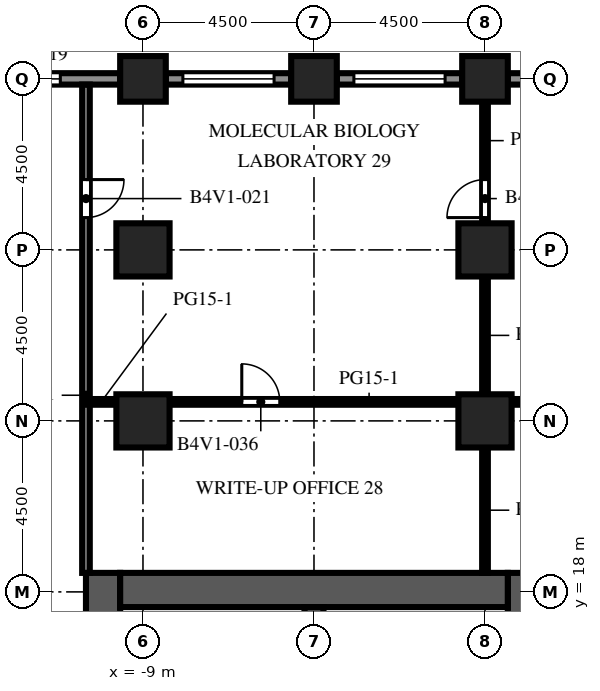
"""IFC4 building model, lengths in metres.
Left out: names, types, materials, properties, quantities, classifications, styles, units other than length and angle.
Written with IfcOpenShell. Run it as: python <this file> out.ifc"""

import sys

from ifc_helpers import new_model, si_unit, direction, frame, frame_2d, origin, origin_2d, place, context, subcontext, project, spatial, rectangle, extrude, element, fill, save


model = new_model("IFC4")
c1 = context("Model", 3, precision=1e-05, world=origin(), true_north=direction((0.0, 1.0)))
c2 = subcontext(c1, "Body", "Model", "MODEL_VIEW")
j1 = project(units=[si_unit("LENGTHUNIT", "METRE"), si_unit("PLANEANGLEUNIT", "RADIAN")], contexts=[c1])
p1 = place(None, origin())
s1 = spatial("IfcSite", under=j1, at=p1, CompositionType="ELEMENT")
p2 = place(p1, origin())
s2 = spatial("IfcBuilding", under=s1, at=p2, CompositionType="ELEMENT")
p3 = place(p2, frame((0.0, 0.0, 133.1)))
s3 = spatial("IfcBuildingStorey", under=s2, at=p3, CompositionType="ELEMENT", Elevation=133.1)
for number, where, z_axis, x_axis in (
    (1, (-9.0, 31.5, 0.0), (0.0, 0.0, 1.0), (1.0, 0.0, 0.0)),
    (2, (-4.5, 31.5, 0.0), (0.0, 0.0, 1.0), (1.0, 0.0, 0.0)),
    (3, (0.0, 31.5, 0.0), (0.0, 0.0, 1.0), (1.0, 0.0, 0.0)),
):
    element("IfcColumn", number, at=place(p3, frame(where, z_axis=z_axis, x_axis=x_axis)), inside=s3, PredefinedType="COLUMN", context=c2, shape_type="SweptSolid", body=[
        extrude(rectangle(XDim=1.2, YDim=1.2, at=origin_2d()), origin(), (0.0, 0.0, 1.0), 4.1),
    ])
for number, where, z_axis, x_axis in (
    (4, (-9.0, 22.5, 0.0), (0.0, 0.0, 1.0), (1.0, 0.0, 0.0)),
    (5, (-9.0, 27.0, 0.0), (0.0, 0.0, 1.0), (1.0, 0.0, 0.0)),
    (6, (0.0, 22.5, 0.0), (0.0, 0.0, 1.0), (1.0, 0.0, 0.0)),
    (7, (0.0, 27.0, 0.0), (0.0, 0.0, 1.0), (1.0, 0.0, 0.0)),
):
    element("IfcColumn", number, at=place(p3, frame(where, z_axis=z_axis, x_axis=x_axis)), inside=s3, PredefinedType="COLUMN", context=c2, shape_type="SweptSolid", body=[
        extrude(rectangle(XDim=1.4, YDim=1.4, at=origin_2d()), origin(), (0.0, 0.0, 1.0), 4.1),
    ])
p4 = place(p3, frame((-10.05, -9.0, 0.0), z_axis=(0.0, 0.0, 1.0), x_axis=(0.0, 1.0, 0.0)))
e8 = element("IfcWall", 8, at=p4, inside=s3, PredefinedType="SHEAR", context=c2, shape_type="SweptSolid", body=[
    extrude(rectangle(XDim=27.5, YDim=0.9, at=frame_2d((13.75, 0.0))), origin(), (0.0, 0.0, 1.0), 4.1),
])
p5 = place(p4, frame((12.55, 0.0, 0.0)))
e9 = element("IfcOpeningElement", 9, at=p5, cuts=e8, PredefinedType="OPENING", context=c2, shape_type="SweptSolid", body=[
    extrude(rectangle(XDim=2.4, YDim=2.4, at=frame_2d((1.2, 1.2))), frame((0.0, 0.46, 0.0), z_axis=(0.0, -1.0, 0.0), x_axis=(1.0, 0.0, 0.0)), (0.0, 0.0, 1.0), 0.92),
])
p6 = place(p4, frame((6.825, 0.0, 0.0)))
e10 = element("IfcOpeningElement", 10, at=p6, cuts=e8, PredefinedType="OPENING", context=c2, shape_type="SweptSolid", body=[
    extrude(rectangle(XDim=1.2, YDim=2.1, at=frame_2d((0.6, 1.05))), frame((0.0, 0.46, 0.0), z_axis=(0.0, -1.0, 0.0), x_axis=(1.0, 0.0, 0.0)), (0.0, 0.0, 1.0), 0.92),
])
p7 = place(p4, frame((19.475, 0.0, 0.0)))
e11 = element("IfcOpeningElement", 11, at=p7, cuts=e8, PredefinedType="OPENING", context=c2, shape_type="SweptSolid", body=[
    extrude(rectangle(XDim=1.2, YDim=2.1, at=frame_2d((0.6, 1.05))), frame((0.0, 0.46, 0.0), z_axis=(0.0, -1.0, 0.0), x_axis=(1.0, 0.0, 0.0)), (0.0, 0.0, 1.0), 0.92),
])
p8 = place(p3, frame((1.05, -9.0, 0.0), z_axis=(0.0, 0.0, 1.0), x_axis=(0.0, 1.0, 0.0)))
e12 = element("IfcWall", 12, at=p8, inside=s3, PredefinedType="SHEAR", context=c2, shape_type="SweptSolid", body=[
    extrude(rectangle(XDim=27.5, YDim=0.9, at=frame_2d((13.75, 0.0))), origin(), (0.0, 0.0, 1.0), 4.1),
])
p9 = place(p8, frame((12.55, 0.0, 0.0)))
e13 = element("IfcOpeningElement", 13, at=p9, cuts=e12, PredefinedType="OPENING", context=c2, shape_type="SweptSolid", body=[
    extrude(rectangle(XDim=2.4, YDim=2.4, at=frame_2d((1.2, 1.2))), frame((0.0, 0.46, 0.0), z_axis=(0.0, -1.0, 0.0), x_axis=(1.0, 0.0, 0.0)), (0.0, 0.0, 1.0), 0.92),
])
p10 = place(p8, frame((3.975, 0.0, 0.0)))
e14 = element("IfcOpeningElement", 14, at=p10, cuts=e12, PredefinedType="OPENING", context=c2, shape_type="SweptSolid", body=[
    extrude(rectangle(XDim=1.2, YDim=2.1, at=frame_2d((0.6, 1.05))), frame((0.0, 0.46, 0.0), z_axis=(0.0, -1.0, 0.0), x_axis=(1.0, 0.0, 0.0)), (0.0, 0.0, 1.0), 0.92),
])
p11 = place(p8, frame((22.325, 0.0, 0.0)))
e15 = element("IfcOpeningElement", 15, at=p11, cuts=e12, PredefinedType="OPENING", context=c2, shape_type="SweptSolid", body=[
    extrude(rectangle(XDim=1.2, YDim=2.1, at=frame_2d((0.6, 1.05))), frame((0.0, 0.46, 0.0), z_axis=(0.0, -1.0, 0.0), x_axis=(1.0, 0.0, 0.0)), (0.0, 0.0, 1.0), 0.92),
])
p12 = place(p3, frame((-9.6, 18.05, 0.0), z_axis=(0.0, 0.0, 1.0), x_axis=(1.0, 0.0, 0.0)))
e16 = element("IfcWall", 16, at=p12, inside=s3, PredefinedType="SHEAR", context=c2, shape_type="SweptSolid", body=[
    extrude(rectangle(XDim=10.2, YDim=0.9, at=frame_2d((5.1, 0.0))), origin(), (0.0, 0.0, 1.0), 4.1),
])
p13 = place(p3, frame((-4.5, 10.25, 0.0), z_axis=(0.0, 0.0, 1.0), x_axis=(0.0, 1.0, 0.0)))
e17 = element("IfcWall", 17, at=p13, inside=s3, PredefinedType="SHEAR", context=c2, shape_type="SweptSolid", body=[
    extrude(rectangle(XDim=7.35, YDim=0.5, at=frame_2d((3.675, 0.0))), origin(), (0.0, 0.0, 1.0), 4.1),
])
p14 = place(p3, frame((0.6, 31.5, 0.0), z_axis=(0.0, 0.0, 1.0), x_axis=(1.0, 0.0, 0.0)))
e18 = element("IfcWall", 18, at=p14, inside=s3, PredefinedType="SOLIDWALL", context=c2, shape_type="SweptSolid", body=[
    extrude(rectangle(XDim=3.3, YDim=0.3, at=frame_2d((1.65, 0.0))), origin(), (0.0, 0.0, 1.0), 2.75),
])
p15 = place(p14, frame((0.45, 0.0, 0.8)))
e19 = element("IfcOpeningElement", 19, at=p15, cuts=e18, PredefinedType="OPENING", context=c2, shape_type="SweptSolid", body=[
    extrude(rectangle(XDim=2.4, YDim=1.7, at=frame_2d((1.2, 0.85))), frame((0.0, 0.16, 0.0), z_axis=(0.0, -1.0, 0.0), x_axis=(1.0, 0.0, 0.0)), (0.0, 0.0, 1.0), 0.32),
])
p16 = place(p3, frame((-3.9, 31.5, 0.0), z_axis=(0.0, 0.0, 1.0), x_axis=(1.0, 0.0, 0.0)))
e20 = element("IfcWall", 20, at=p16, inside=s3, PredefinedType="SOLIDWALL", context=c2, shape_type="SweptSolid", body=[
    extrude(rectangle(XDim=3.3, YDim=0.3, at=frame_2d((1.65, 0.0))), origin(), (0.0, 0.0, 1.0), 2.75),
])
p17 = place(p16, frame((0.45, 0.0, 0.8)))
e21 = element("IfcOpeningElement", 21, at=p17, cuts=e20, PredefinedType="OPENING", context=c2, shape_type="SweptSolid", body=[
    extrude(rectangle(XDim=2.4, YDim=1.7, at=frame_2d((1.2, 0.85))), frame((0.0, 0.16, 0.0), z_axis=(0.0, -1.0, 0.0), x_axis=(1.0, 0.0, 0.0)), (0.0, 0.0, 1.0), 0.32),
])
p18 = place(p3, frame((-8.4, 31.5, 0.0), z_axis=(0.0, 0.0, 1.0), x_axis=(1.0, 0.0, 0.0)))
e22 = element("IfcWall", 22, at=p18, inside=s3, PredefinedType="SOLIDWALL", context=c2, shape_type="SweptSolid", body=[
    extrude(rectangle(XDim=3.3, YDim=0.3, at=frame_2d((1.65, 0.0))), origin(), (0.0, 0.0, 1.0), 2.75),
])
p19 = place(p18, frame((0.45, 0.0, 0.8)))
e23 = element("IfcOpeningElement", 23, at=p19, cuts=e22, PredefinedType="OPENING", context=c2, shape_type="SweptSolid", body=[
    extrude(rectangle(XDim=2.4, YDim=1.7, at=frame_2d((1.2, 0.85))), frame((0.0, 0.16, 0.0), z_axis=(0.0, -1.0, 0.0), x_axis=(1.0, 0.0, 0.0)), (0.0, 0.0, 1.0), 0.32),
])
p20 = place(p3, frame((-12.9, 31.5, 0.0), z_axis=(0.0, 0.0, 1.0), x_axis=(1.0, 0.0, 0.0)))
e24 = element("IfcWall", 24, at=p20, inside=s3, PredefinedType="SOLIDWALL", context=c2, shape_type="SweptSolid", body=[
    extrude(rectangle(XDim=3.3, YDim=0.3, at=frame_2d((1.65, 0.0))), origin(), (0.0, 0.0, 1.0), 2.75),
])
p21 = place(p20, frame((0.525, 0.0, 0.8)))
e25 = element("IfcOpeningElement", 25, at=p21, cuts=e24, PredefinedType="OPENING", context=c2, shape_type="SweptSolid", body=[
    extrude(rectangle(XDim=1.2, YDim=1.7, at=frame_2d((0.6, 0.85))), frame((0.0, 0.16, 0.0), z_axis=(0.0, -1.0, 0.0), x_axis=(1.0, 0.0, 0.0)), (0.0, 0.0, 1.0), 0.32),
])
p22 = place(p3, frame((-0.8, 14.807, 0.0), z_axis=(0.0, 0.0, 1.0), x_axis=(0.0, 1.0, 0.0)))
e26 = element("IfcWall", 26, at=p22, inside=s3, PredefinedType="PARTITIONING", context=c2, shape_type="SweptSolid", body=[
    extrude(rectangle(XDim=2.793, YDim=0.1, at=frame_2d((1.396, 0.0))), origin(), (0.0, 0.0, 1.0), 3.65),
])
p23 = place(p22, frame((0.896, 0.0, 0.0)))
e27 = element("IfcOpeningElement", 27, at=p23, cuts=e26, PredefinedType="OPENING", context=c2, shape_type="SweptSolid", body=[
    extrude(rectangle(XDim=1.0, YDim=2.1, at=frame_2d((0.5, 1.05))), frame((0.0, 0.06, 0.0), z_axis=(0.0, -1.0, 0.0), x_axis=(1.0, 0.0, 0.0)), (0.0, 0.0, 1.0), 0.12),
])
p24 = place(p3, frame((-10.5, 31.35, 0.0), z_axis=(0.0, 0.0, 1.0), x_axis=(0.0, -1.0, 0.0)))
e28 = element("IfcWall", 28, at=p24, inside=s3, PredefinedType="PARTITIONING", context=c2, shape_type="SweptSolid", body=[
    extrude(rectangle(XDim=12.85, YDim=0.2, at=frame_2d((6.425, 0.0))), origin(), (0.0, 0.0, 1.0), 3.65),
])
p25 = place(p24, frame((2.5, 0.0, 0.0)))
e29 = element("IfcOpeningElement", 29, at=p25, cuts=e28, PredefinedType="OPENING", context=c2, shape_type="SweptSolid", body=[
    extrude(rectangle(XDim=1.0, YDim=2.1, at=frame_2d((0.5, 1.05))), frame((0.0, 0.11, 0.0), z_axis=(0.0, -1.0, 0.0), x_axis=(1.0, 0.0, 0.0)), (0.0, 0.0, 1.0), 0.22),
])
p26 = place(p3, frame((0.0, 18.5, 0.0), z_axis=(0.0, 0.0, 1.0), x_axis=(0.0, 1.0, 0.0)))
e30 = element("IfcWall", 30, at=p26, inside=s3, PredefinedType="PARTITIONING", context=c2, shape_type="SweptSolid", body=[
    extrude(rectangle(XDim=3.3, YDim=0.15, at=frame_2d((1.65, 0.0))), origin(), (0.0, 0.0, 1.0), 3.65),
])
p27 = place(p3, frame((0.0, 23.2, 0.0), z_axis=(0.0, 0.0, 1.0), x_axis=(0.0, 1.0, 0.0)))
e31 = element("IfcWall", 31, at=p27, inside=s3, PredefinedType="PARTITIONING", context=c2, shape_type="SweptSolid", body=[
    extrude(rectangle(XDim=3.1, YDim=0.15, at=frame_2d((1.55, 0.0))), origin(), (0.0, 0.0, 1.0), 3.65),
])
p28 = place(p3, frame((0.0, 30.9, 0.0), z_axis=(0.0, 0.0, 1.0), x_axis=(0.0, -1.0, 0.0)))
e32 = element("IfcWall", 32, at=p28, inside=s3, PredefinedType="PARTITIONING", context=c2, shape_type="SweptSolid", body=[
    extrude(rectangle(XDim=3.2, YDim=0.15, at=frame_2d((1.6, 0.0))), origin(), (0.0, 0.0, 1.0), 3.65),
])
p29 = place(p28, frame((2.05, 0.0, 0.0)))
e33 = element("IfcOpeningElement", 33, at=p29, cuts=e32, PredefinedType="OPENING", context=c2, shape_type="SweptSolid", body=[
    extrude(rectangle(XDim=1.0, YDim=2.1, at=frame_2d((0.5, 1.05))), frame((0.0, 0.085, 0.0), z_axis=(0.0, -1.0, 0.0), x_axis=(1.0, 0.0, 0.0)), (0.0, 0.0, 1.0), 0.17),
])
p30 = place(p3, frame((-10.5, 23.0, 0.0), z_axis=(0.0, 0.0, 1.0), x_axis=(1.0, 0.0, 0.0)))
e34 = element("IfcWall", 34, at=p30, inside=s3, PredefinedType="PARTITIONING", context=c2, shape_type="SweptSolid", body=[
    extrude(rectangle(XDim=0.8, YDim=0.15, at=frame_2d((0.4, 0.0))), origin(), (0.0, 0.0, 1.0), 3.65),
])
p31 = place(p3, frame((-0.7, 23.0, 0.0), z_axis=(0.0, 0.0, 1.0), x_axis=(-1.0, 0.0, 0.0)))
e35 = element("IfcWall", 35, at=p31, inside=s3, PredefinedType="PARTITIONING", context=c2, shape_type="SweptSolid", body=[
    extrude(rectangle(XDim=7.6, YDim=0.15, at=frame_2d((3.8, 0.0))), origin(), (0.0, 0.0, 1.0), 3.65),
])
p32 = place(p31, frame((4.7, 0.0, 0.0)))
e36 = element("IfcOpeningElement", 36, at=p32, cuts=e35, PredefinedType="OPENING", context=c2, shape_type="SweptSolid", body=[
    extrude(rectangle(XDim=1.0, YDim=2.1, at=frame_2d((0.5, 1.05))), frame((0.0, 0.085, 0.0), z_axis=(0.0, -1.0, 0.0), x_axis=(1.0, 0.0, 0.0)), (0.0, 0.0, 1.0), 0.17),
])
p33 = place(p3, frame((8.3, 23.0, 0.0), z_axis=(0.0, 0.0, 1.0), x_axis=(-1.0, 0.0, 0.0)))
e37 = element("IfcWall", 37, at=p33, inside=s3, PredefinedType="PARTITIONING", context=c2, shape_type="SweptSolid", body=[
    extrude(rectangle(XDim=7.6, YDim=0.15, at=frame_2d((3.8, 0.0))), origin(), (0.0, 0.0, 1.0), 3.65),
])
p34 = place(p33, frame((5.7, 0.0, 0.0)))
e38 = element("IfcOpeningElement", 38, at=p34, cuts=e37, PredefinedType="OPENING", context=c2, shape_type="SweptSolid", body=[
    extrude(rectangle(XDim=1.0, YDim=2.1, at=frame_2d((0.5, 1.05))), frame((0.0, 0.085, 0.0), z_axis=(0.0, -1.0, 0.0), x_axis=(1.0, 0.0, 0.0)), (0.0, 0.0, 1.0), 0.17),
])
p35 = place(p17, origin())
e39 = element("IfcWindow", 39, at=p35, inside=s3, PartitioningType="SINGLE_PANEL", PredefinedType="WINDOW", context=c2, shape_type="SweptSolid", body=[
    extrude(rectangle(XDim=2.4, YDim=1.7, at=frame_2d((1.2, 0.85))), frame((0.0, 0.03, 0.0), z_axis=(0.0, -1.0, 0.0), x_axis=(1.0, 0.0, 0.0)), (0.0, 0.0, 1.0), 0.06),
])
fill(e21, e39)
p36 = place(p19, origin())
e40 = element("IfcWindow", 40, at=p36, inside=s3, PartitioningType="SINGLE_PANEL", PredefinedType="WINDOW", context=c2, shape_type="SweptSolid", body=[
    extrude(rectangle(XDim=2.4, YDim=1.7, at=frame_2d((1.2, 0.85))), frame((0.0, 0.03, 0.0), z_axis=(0.0, -1.0, 0.0), x_axis=(1.0, 0.0, 0.0)), (0.0, 0.0, 1.0), 0.06),
])
fill(e23, e40)
p37 = place(p21, origin())
e41 = element("IfcWindow", 41, at=p37, inside=s3, PartitioningType="SINGLE_PANEL", PredefinedType="WINDOW", context=c2, shape_type="SweptSolid", body=[
    extrude(rectangle(XDim=1.2, YDim=1.7, at=frame_2d((0.6, 0.85))), frame((0.0, 0.03, 0.0), z_axis=(0.0, -1.0, 0.0), x_axis=(1.0, 0.0, 0.0)), (0.0, 0.0, 1.0), 0.06),
])
fill(e25, e41)
p38 = place(p25, origin())
e42 = element("IfcDoor", 42, at=p38, inside=s3, OperationType="SINGLE_SWING_LEFT", PredefinedType="DOOR", context=c2, shape_type="SweptSolid", body=[
    extrude(rectangle(XDim=1.0, YDim=2.1, at=frame_2d((0.5, 1.05))), frame((0.0, 0.025, 0.0), z_axis=(0.0, -1.0, 0.0), x_axis=(1.0, 0.0, 0.0)), (0.0, 0.0, 1.0), 0.05),
])
fill(e29, e42)
p39 = place(p29, origin())
e43 = element("IfcDoor", 43, at=p39, inside=s3, OperationType="SINGLE_SWING_RIGHT", PredefinedType="DOOR", context=c2, shape_type="SweptSolid", body=[
    extrude(rectangle(XDim=1.0, YDim=2.1, at=frame_2d((0.5, 1.05))), frame((0.0, 0.025, 0.0), z_axis=(0.0, -1.0, 0.0), x_axis=(1.0, 0.0, 0.0)), (0.0, 0.0, 1.0), 0.05),
])
fill(e33, e43)
p40 = place(p32, origin())
e44 = element("IfcDoor", 44, at=p40, inside=s3, OperationType="SINGLE_SWING_RIGHT", PredefinedType="DOOR", context=c2, shape_type="SweptSolid", body=[
    extrude(rectangle(XDim=1.0, YDim=2.1, at=frame_2d((0.5, 1.05))), frame((0.0, 0.025, 0.0), z_axis=(0.0, -1.0, 0.0), x_axis=(1.0, 0.0, 0.0)), (0.0, 0.0, 1.0), 0.05),
])
fill(e36, e44)
save(model, sys.argv[1])
